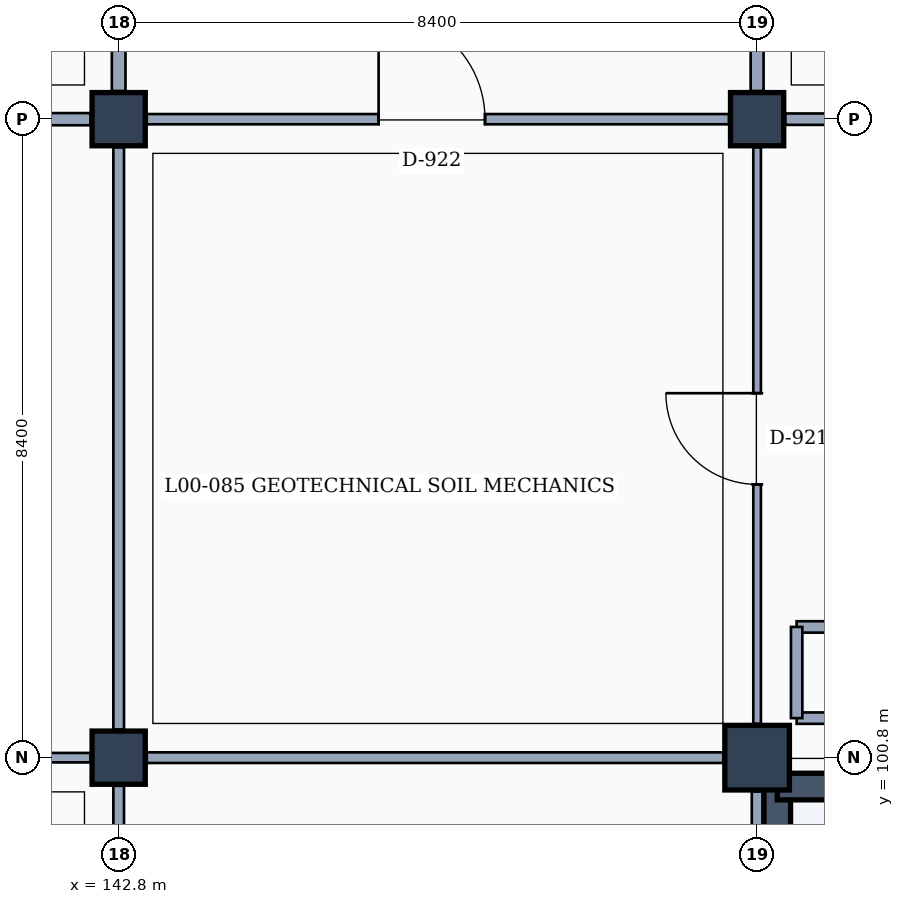
"""IFC4 building model, lengths in metres.
Left out: names, types, materials, properties, quantities, classifications, styles, units other than length and angle.
Written with IfcOpenShell. Run it as: python <this file> out.ifc"""

import sys

from ifc_helpers import new_model, si_unit, direction, frame, frame_2d, origin, origin_2d, place, context, subcontext, project, spatial, rectangle, extrude, element, fill, save


model = new_model("IFC4")
c1 = context("Model", 3, precision=1e-05, world=origin(), true_north=direction((0.0, 1.0)))
c2 = subcontext(c1, "Body", "Model", "MODEL_VIEW")
j1 = project(units=[si_unit("LENGTHUNIT", "METRE"), si_unit("PLANEANGLEUNIT", "RADIAN")], contexts=[c1])
p1 = place(None, origin())
s1 = spatial("IfcSite", under=j1, at=p1, CompositionType="ELEMENT")
p2 = place(p1, origin())
s2 = spatial("IfcBuilding", under=s1, at=p2, CompositionType="ELEMENT")
p3 = place(p2, origin())
s3 = spatial("IfcBuildingStorey", under=s2, at=p3, CompositionType="ELEMENT", Elevation=0.0)
for number, where, z_axis, x_axis in (
    (1, (142.8, 100.8, 0.0), (0.0, 0.0, 1.0), (1.0, 0.0, 0.0)),
    (2, (142.8, 109.2, 0.0), (0.0, 0.0, 1.0), (1.0, 0.0, 0.0)),
):
    element("IfcColumn", number, at=place(p3, frame(where, z_axis=z_axis, x_axis=x_axis)), inside=s3, PredefinedType="COLUMN", context=c2, shape_type="SweptSolid", body=[
        extrude(rectangle(XDim=0.7, YDim=0.7, at=origin_2d()), origin(), (0.0, 0.0, 1.0), 4.8),
    ])
p4 = place(p3, frame((151.2, 100.8, 0.0), z_axis=(0.0, 0.0, 1.0), x_axis=(1.0, 0.0, 0.0)))
e3 = element("IfcColumn", 3, at=p4, inside=s3, PredefinedType="COLUMN", context=c2, shape_type="SweptSolid", body=[
    extrude(rectangle(XDim=0.85, YDim=0.85, at=origin_2d()), origin(), (0.0, 0.0, 1.0), 4.8),
])
p5 = place(p3, frame((151.2, 109.2, 0.0), z_axis=(0.0, 0.0, 1.0), x_axis=(1.0, 0.0, 0.0)))
e4 = element("IfcColumn", 4, at=p5, inside=s3, PredefinedType="COLUMN", context=c2, shape_type="SweptSolid", body=[
    extrude(rectangle(XDim=0.7, YDim=0.7, at=origin_2d()), origin(), (0.0, 0.0, 1.0), 4.8),
])
p6 = place(p3, frame((151.465, 92.65, 0.0), z_axis=(0.0, 0.0, 1.0), x_axis=(0.0, 1.0, 0.0)))
e5 = element("IfcWall", 5, at=p6, inside=s3, PredefinedType="SHEAR", context=c2, shape_type="SweptSolid", body=[
    extrude(rectangle(XDim=7.94, YDim=0.35, at=frame_2d((3.97, 0.0))), origin(), (0.0, 0.0, 1.0), 4.55),
])
p7 = place(p3, frame((151.465, 100.42, 0.0), z_axis=(0.0, 0.0, 1.0), x_axis=(1.0, 0.0, 0.0)))
e6 = element("IfcWall", 6, at=p7, inside=s3, PredefinedType="SHEAR", context=c2, shape_type="SweptSolid", body=[
    extrude(rectangle(XDim=7.875, YDim=0.35, at=frame_2d((3.938, 0.0))), origin(), (0.0, 0.0, 1.0), 4.55),
])
for number, where, z_axis, x_axis in (
    (7, (151.72, 101.32, 0.0), (0.0, 0.0, 1.0), (1.0, 0.0, 0.0)),
    (8, (152.92, 102.52, 0.0), (0.0, 0.0, 1.0), (-1.0, 0.0, 0.0)),
    (9, (151.72, 102.52, 0.0), (0.0, 0.0, 1.0), (0.0, -1.0, 0.0)),
):
    element("IfcWall", number, at=place(p3, frame(where, z_axis=z_axis, x_axis=x_axis)), inside=s3, PredefinedType="PARTITIONING", context=c2, shape_type="SweptSolid", body=[
        extrude(rectangle(XDim=1.2, YDim=0.15, at=frame_2d((0.6, 0.0))), origin(), (0.0, 0.0, 1.0), 4.55),
    ])
p8 = place(p3, frame((142.8, 92.77, 0.0), z_axis=(0.0, 0.0, 1.0), x_axis=(0.0, 1.0, 0.0)))
e10 = element("IfcWall", 10, at=p8, inside=s3, PredefinedType="PARTITIONING", context=c2, shape_type="SweptSolid", body=[
    extrude(rectangle(XDim=7.66, YDim=0.14, at=frame_2d((3.83, 0.0))), origin(), (0.0, 0.0, 1.0), 3.92),
])
p9 = place(p3, frame((134.72, 100.8, 0.0), z_axis=(0.0, 0.0, 1.0), x_axis=(1.0, 0.0, 0.0)))
e11 = element("IfcWall", 11, at=p9, inside=s3, PredefinedType="PARTITIONING", context=c2, shape_type="SweptSolid", body=[
    extrude(rectangle(XDim=7.71, YDim=0.125, at=frame_2d((3.855, 0.0))), origin(), (0.0, 0.0, 1.0), 3.86),
])
p10 = place(p9, frame((2.9, 0.0, 0.0)))
e12 = element("IfcOpeningElement", 12, at=p10, cuts=e11, PredefinedType="OPENING", context=c2, shape_type="SweptSolid", body=[
    extrude(rectangle(XDim=1.7, YDim=2.3, at=frame_2d((0.85, 1.15))), frame((0.0, 0.073, 0.0), z_axis=(0.0, -1.0, 0.0), x_axis=(1.0, 0.0, 0.0)), (0.0, 0.0, 1.0), 0.145),
])
p11 = place(p3, frame((142.8, 101.17, 0.0), z_axis=(0.0, 0.0, 1.0), x_axis=(0.0, 1.0, 0.0)))
e13 = element("IfcWall", 13, at=p11, inside=s3, PredefinedType="PARTITIONING", context=c2, shape_type="SweptSolid", body=[
    extrude(rectangle(XDim=7.66, YDim=0.14, at=frame_2d((3.83, 0.0))), origin(), (0.0, 0.0, 1.0), 3.92),
])
p12 = place(p3, frame((134.72, 109.2, 0.0), z_axis=(0.0, 0.0, 1.0), x_axis=(1.0, 0.0, 0.0)))
e14 = element("IfcWall", 14, at=p12, inside=s3, PredefinedType="PARTITIONING", context=c2, shape_type="SweptSolid", body=[
    extrude(rectangle(XDim=7.71, YDim=0.16, at=frame_2d((3.855, 0.0))), origin(), (0.0, 0.0, 1.0), 3.86),
])
p13 = place(p12, frame((2.8, 0.0, 0.0)))
e15 = element("IfcOpeningElement", 15, at=p13, cuts=e14, PredefinedType="OPENING", context=c2, shape_type="SweptSolid", body=[
    extrude(rectangle(XDim=1.9, YDim=2.4, at=frame_2d((0.95, 1.2))), frame((0.0, 0.09, 0.0), z_axis=(0.0, -1.0, 0.0), x_axis=(1.0, 0.0, 0.0)), (0.0, 0.0, 1.0), 0.18),
])
p14 = place(p3, frame((142.8, 109.57, 0.0), z_axis=(0.0, 0.0, 1.0), x_axis=(0.0, 1.0, 0.0)))
e16 = element("IfcWall", 16, at=p14, inside=s3, PredefinedType="PARTITIONING", context=c2, shape_type="SweptSolid", body=[
    extrude(rectangle(XDim=7.66, YDim=0.18, at=frame_2d((3.83, 0.0))), origin(), (0.0, 0.0, 1.0), 3.92),
])
p15 = place(p3, frame((151.2, 92.845, 0.0), z_axis=(0.0, 0.0, 1.0), x_axis=(0.0, 1.0, 0.0)))
e17 = element("IfcWall", 17, at=p15, inside=s3, PredefinedType="PARTITIONING", context=c2, shape_type="SweptSolid", body=[
    extrude(rectangle(XDim=7.51, YDim=0.14, at=frame_2d((3.755, 0.0))), origin(), (0.0, 0.0, 1.0), 3.92),
])
p16 = place(p3, frame((143.17, 100.8, 0.0), z_axis=(0.0, 0.0, 1.0), x_axis=(1.0, 0.0, 0.0)))
e18 = element("IfcWall", 18, at=p16, inside=s3, PredefinedType="PARTITIONING", context=c2, shape_type="SweptSolid", body=[
    extrude(rectangle(XDim=7.585, YDim=0.14, at=frame_2d((3.792, 0.0))), origin(), (0.0, 0.0, 1.0), 3.87),
])
p17 = place(p3, frame((151.2, 101.245, 0.0), z_axis=(0.0, 0.0, 1.0), x_axis=(0.0, 1.0, 0.0)))
e19 = element("IfcWall", 19, at=p17, inside=s3, PredefinedType="MOVABLE", context=c2, shape_type="SweptSolid", body=[
    extrude(rectangle(XDim=7.585, YDim=0.1, at=frame_2d((3.792, 0.0))), origin(), (0.0, 0.0, 1.0), 3.92),
])
p18 = place(p17, frame((3.15, 0.0, 0.0)))
e20 = element("IfcOpeningElement", 20, at=p18, cuts=e19, PredefinedType="OPENING", context=c2, shape_type="SweptSolid", body=[
    extrude(rectangle(XDim=1.2, YDim=2.2, at=frame_2d((0.6, 1.1))), frame((0.0, 0.06, 0.0), z_axis=(0.0, -1.0, 0.0), x_axis=(1.0, 0.0, 0.0)), (0.0, 0.0, 1.0), 0.12),
])
p19 = place(p3, frame((143.17, 109.2, 0.0), z_axis=(0.0, 0.0, 1.0), x_axis=(1.0, 0.0, 0.0)))
e21 = element("IfcWall", 21, at=p19, inside=s3, PredefinedType="PARTITIONING", context=c2, shape_type="SweptSolid", body=[
    extrude(rectangle(XDim=7.66, YDim=0.135, at=frame_2d((3.83, 0.0))), origin(), (0.0, 0.0, 1.0), 3.87),
])
p20 = place(p19, frame((3.05, 0.0, 0.0)))
e22 = element("IfcOpeningElement", 22, at=p20, cuts=e21, PredefinedType="OPENING", context=c2, shape_type="SweptSolid", body=[
    extrude(rectangle(XDim=1.4, YDim=2.25, at=frame_2d((0.7, 1.125))), frame((0.0, 0.077, 0.0), z_axis=(0.0, -1.0, 0.0), x_axis=(1.0, 0.0, 0.0)), (0.0, 0.0, 1.0), 0.155),
])
p21 = place(p3, frame((151.2, 109.57, 0.0), z_axis=(0.0, 0.0, 1.0), x_axis=(0.0, 1.0, 0.0)))
e23 = element("IfcWall", 23, at=p21, inside=s3, PredefinedType="PARTITIONING", context=c2, shape_type="SweptSolid", body=[
    extrude(rectangle(XDim=7.66, YDim=0.17, at=frame_2d((3.83, 0.0))), origin(), (0.0, 0.0, 1.0), 3.92),
])
p22 = place(p3, frame((151.57, 109.2, 0.0), z_axis=(0.0, 0.0, 1.0), x_axis=(1.0, 0.0, 0.0)))
e24 = element("IfcWall", 24, at=p22, inside=s3, PredefinedType="PARTITIONING", context=c2, shape_type="SweptSolid", body=[
    extrude(rectangle(XDim=7.66, YDim=0.15, at=frame_2d((3.83, 0.0))), origin(), (0.0, 0.0, 1.0), 3.87),
])
p23 = place(p22, frame((2.8, 0.0, 0.0)))
e25 = element("IfcOpeningElement", 25, at=p23, cuts=e24, PredefinedType="OPENING", context=c2, shape_type="SweptSolid", body=[
    extrude(rectangle(XDim=1.9, YDim=2.4, at=frame_2d((0.95, 1.2))), frame((0.0, 0.085, 0.0), z_axis=(0.0, -1.0, 0.0), x_axis=(1.0, 0.0, 0.0)), (0.0, 0.0, 1.0), 0.17),
])
p24 = place(p18, origin())
e26 = element("IfcDoor", 26, at=p24, inside=s3, OperationType="SINGLE_SWING_RIGHT", PredefinedType="DOOR", context=c2, shape_type="SweptSolid", body=[
    extrude(rectangle(XDim=1.2, YDim=2.2, at=frame_2d((0.6, 1.1))), frame((0.0, 0.025, 0.0), z_axis=(0.0, -1.0, 0.0), x_axis=(1.0, 0.0, 0.0)), (0.0, 0.0, 1.0), 0.05),
])
fill(e20, e26)
p25 = place(p20, origin())
e27 = element("IfcDoor", 27, at=p25, inside=s3, OperationType="SINGLE_SWING_LEFT", PredefinedType="DOOR", context=c2, shape_type="SweptSolid", body=[
    extrude(rectangle(XDim=1.4, YDim=2.25, at=frame_2d((0.7, 1.125))), frame((0.0, 0.025, 0.0), z_axis=(0.0, -1.0, 0.0), x_axis=(1.0, 0.0, 0.0)), (0.0, 0.0, 1.0), 0.05),
])
fill(e22, e27)
save(model, sys.argv[1])
